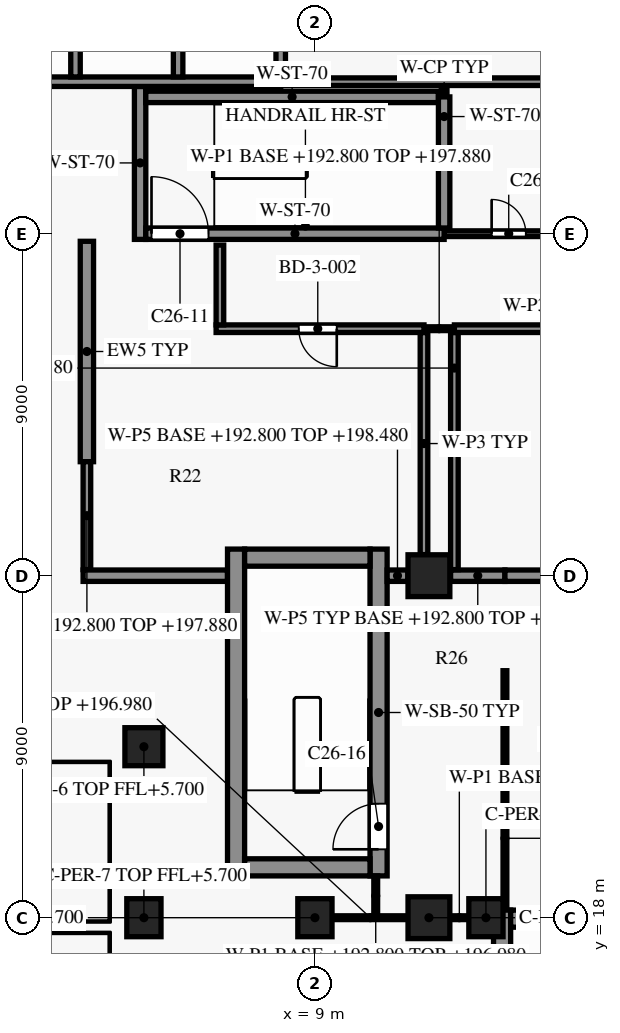
"""IFC4 building model, lengths in metres.
Left out: names, types, materials, properties, quantities, classifications, styles, units other than length and angle.
Written with IfcOpenShell. Run it as: python <this file> out.ifc"""

import sys

from ifc_helpers import new_model, si_unit, direction, frame, frame_2d, origin, origin_2d, place, context, subcontext, project, spatial, rectangle, extrude, element, fill, save


model = new_model("IFC4")
c1 = context("Model", 3, precision=1e-05, world=origin(), true_north=direction((0.0, 1.0)))
c2 = subcontext(c1, "Body", "Model", "MODEL_VIEW")
j1 = project(units=[si_unit("LENGTHUNIT", "METRE"), si_unit("PLANEANGLEUNIT", "RADIAN")], contexts=[c1])
p1 = place(None, origin())
s1 = spatial("IfcSite", under=j1, at=p1, CompositionType="ELEMENT")
p2 = place(p1, origin())
s2 = spatial("IfcBuilding", under=s1, at=p2, CompositionType="ELEMENT")
p3 = place(p2, frame((0.0, 0.0, 192.8)))
s3 = spatial("IfcBuildingStorey", under=s2, at=p3, CompositionType="ELEMENT", Elevation=192.8)
for number, where, z_axis, x_axis in (
    (1, (12.0, 18.0, 0.0), (0.0, 0.0, 1.0), (1.0, 0.0, 0.0)),
    (2, (12.0, 27.0, 0.0), (0.0, 0.0, 1.0), (1.0, 0.0, 0.0)),
):
    element("IfcColumn", number, at=place(p3, frame(where, z_axis=z_axis, x_axis=x_axis)), inside=s3, PredefinedType="COLUMN", context=c2, shape_type="SweptSolid", body=[
        extrude(rectangle(XDim=1.1, YDim=1.1, at=origin_2d()), origin(), (0.0, 0.0, 1.0), 6.0),
    ])
p4 = place(p3, frame((3.0, 30.0, 0.0), z_axis=(0.0, 0.0, 1.0), x_axis=(0.0, 1.0, 0.0)))
e3 = element("IfcWall", 3, at=p4, inside=s3, PredefinedType="SOLIDWALL", context=c2, shape_type="SweptSolid", body=[
    extrude(rectangle(XDim=5.8, YDim=0.35, at=frame_2d((2.9, 0.0))), origin(), (0.0, 0.0, 1.0), 5.5),
])
for number, where, z_axis, x_axis in (
    (4, (14.15, 17.975, 0.0), (0.0, 0.0, 1.0), (1.0, 0.0, 0.0)),
    (5, (7.15, 19.325, 0.0), (0.0, 0.0, 1.0), (1.0, 0.0, 0.0)),
    (6, (7.15, 27.475, 0.0), (0.0, 0.0, 1.0), (1.0, 0.0, 0.0)),
):
    element("IfcWall", number, at=place(p3, frame(where, z_axis=z_axis, x_axis=x_axis)), inside=s3, PredefinedType="SHEAR", context=c2, shape_type="SweptSolid", body=[
        extrude(rectangle(XDim=3.3, YDim=0.45, at=frame_2d((1.65, 0.0))), origin(), (0.0, 0.0, 1.0), 5.7),
    ])
p5 = place(p3, frame((12.4, 36.0, 0.0), z_axis=(0.0, 0.0, 1.0), x_axis=(1.0, 0.0, 0.0)))
e7 = element("IfcWall", 7, at=p5, inside=s3, PredefinedType="SHEAR", context=c2, shape_type="SweptSolid", body=[
    extrude(rectangle(XDim=11.825, YDim=0.15, at=frame_2d((5.913, 0.0))), origin(), (0.0, 0.0, 1.0), 5.7),
])
p6 = place(p5, frame((1.25, 0.0, 0.0)))
e8 = element("IfcOpeningElement", 8, at=p6, cuts=e7, PredefinedType="OPENING", context=c2, shape_type="SweptSolid", body=[
    extrude(rectangle(XDim=0.9, YDim=2.1, at=frame_2d((0.45, 1.05))), frame((0.0, 0.085, 0.0), z_axis=(0.0, -1.0, 0.0), x_axis=(1.0, 0.0, 0.0)), (0.0, 0.0, 1.0), 0.17),
])
p7 = place(p5, frame((5.2, 0.0, 0.0)))
e9 = element("IfcOpeningElement", 9, at=p7, cuts=e7, PredefinedType="OPENING", context=c2, shape_type="SweptSolid", body=[
    extrude(rectangle(XDim=0.9, YDim=2.1, at=frame_2d((0.45, 1.05))), frame((0.0, 0.085, 0.0), z_axis=(0.0, -1.0, 0.0), x_axis=(1.0, 0.0, 0.0)), (0.0, 0.0, 1.0), 0.17),
])
p8 = place(p5, frame((9.425, 0.0, 0.0)))
e10 = element("IfcOpeningElement", 10, at=p8, cuts=e7, PredefinedType="OPENING", context=c2, shape_type="SweptSolid", body=[
    extrude(rectangle(XDim=0.95, YDim=2.1, at=frame_2d((0.475, 1.05))), frame((0.0, 0.085, 0.0), z_axis=(0.0, -1.0, 0.0), x_axis=(1.0, 0.0, 0.0)), (0.0, 0.0, 1.0), 0.17),
])
p9 = place(p3, frame((4.55, 36.0, 0.0), z_axis=(0.0, 0.0, 1.0), x_axis=(1.0, 0.0, 0.0)))
e11 = element("IfcWall", 11, at=p9, inside=s3, PredefinedType="SHEAR", context=c2, shape_type="SweptSolid", body=[
    extrude(rectangle(XDim=7.85, YDim=0.3, at=frame_2d((3.925, 0.0))), origin(), (0.0, 0.0, 1.0), 5.7),
])
p10 = place(p9, frame((0.15, 0.0, 0.0)))
e12 = element("IfcOpeningElement", 12, at=p10, cuts=e11, PredefinedType="OPENING", context=c2, shape_type="SweptSolid", body=[
    extrude(rectangle(XDim=1.5, YDim=2.2, at=frame_2d((0.75, 1.1))), frame((0.0, 0.16, 0.0), z_axis=(0.0, -1.0, 0.0), x_axis=(1.0, 0.0, 0.0)), (0.0, 0.0, 1.0), 0.32),
])
p11 = place(p3, frame((4.55, 39.6, 0.0), z_axis=(0.0, 0.0, 1.0), x_axis=(1.0, 0.0, 0.0)))
e13 = element("IfcWall", 13, at=p11, inside=s3, PredefinedType="SHEAR", context=c2, shape_type="SweptSolid", body=[
    extrude(rectangle(XDim=7.7, YDim=0.3, at=frame_2d((3.85, 0.0))), origin(), (0.0, 0.0, 1.0), 5.7),
])
p12 = place(p3, frame((8.1, 40.0, 0.0), z_axis=(0.0, 0.0, 1.0), x_axis=(1.0, 0.0, 0.0)))
e14 = element("IfcWall", 14, at=p12, inside=s3, PredefinedType="PARTITIONING", context=c2, shape_type="SweptSolid", body=[
    extrude(rectangle(XDim=16.1, YDim=0.2, at=frame_2d((8.05, 0.0))), origin(), (0.0, 0.0, 1.0), 5.7),
])
p13 = place(p3, frame((0.125, 40.0, 0.0), z_axis=(0.0, 0.0, 1.0), x_axis=(1.0, 0.0, 0.0)))
e15 = element("IfcWall", 15, at=p13, inside=s3, PredefinedType="SHEAR", context=c2, shape_type="SweptSolid", body=[
    extrude(rectangle(XDim=7.975, YDim=0.25, at=frame_2d((3.988, 0.0))), origin(), (0.0, 0.0, 1.0), 5.7),
])
p14 = place(p3, frame((2.7, 40.125, 0.0), z_axis=(0.0, 0.0, 1.0), x_axis=(0.0, 1.0, 0.0)))
e16 = element("IfcWall", 16, at=p14, inside=s3, PredefinedType="SHEAR", context=c2, shape_type="SweptSolid", body=[
    extrude(rectangle(XDim=2.95, YDim=0.25, at=frame_2d((1.475, 0.0))), origin(), (0.0, 0.0, 1.0), 5.7),
])
p15 = place(p3, frame((4.4, 35.85, 0.0), z_axis=(0.0, 0.0, 1.0), x_axis=(0.0, 1.0, 0.0)))
e17 = element("IfcWall", 17, at=p15, inside=s3, PredefinedType="SHEAR", context=c2, shape_type="SweptSolid", body=[
    extrude(rectangle(XDim=4.025, YDim=0.3, at=frame_2d((2.012, 0.0))), origin(), (0.0, 0.0, 1.0), 5.7),
])
p16 = place(p3, frame((5.4, 40.125, 0.0), z_axis=(0.0, 0.0, 1.0), x_axis=(0.0, 1.0, 0.0)))
e18 = element("IfcWall", 18, at=p16, inside=s3, PredefinedType="SHEAR", context=c2, shape_type="SweptSolid", body=[
    extrude(rectangle(XDim=2.95, YDim=0.25, at=frame_2d((1.475, 0.0))), origin(), (0.0, 0.0, 1.0), 5.7),
])
p17 = place(p3, frame((6.925, 19.1, 0.0), z_axis=(0.0, 0.0, 1.0), x_axis=(0.0, 1.0, 0.0)))
e19 = element("IfcWall", 19, at=p17, inside=s3, PredefinedType="SHEAR", context=c2, shape_type="SweptSolid", body=[
    extrude(rectangle(XDim=8.6, YDim=0.45, at=frame_2d((4.3, 0.0))), origin(), (0.0, 0.0, 1.0), 5.7),
])
p18 = place(p3, frame((8.1, 40.125, 0.0), z_axis=(0.0, 0.0, 1.0), x_axis=(0.0, 1.0, 0.0)))
e20 = element("IfcWall", 20, at=p18, inside=s3, PredefinedType="SHEAR", context=c2, shape_type="SweptSolid", body=[
    extrude(rectangle(XDim=2.95, YDim=0.25, at=frame_2d((1.475, 0.0))), origin(), (0.0, 0.0, 1.0), 5.7),
])
p19 = place(p3, frame((10.675, 19.1, 0.0), z_axis=(0.0, 0.0, 1.0), x_axis=(0.0, 1.0, 0.0)))
e21 = element("IfcWall", 21, at=p19, inside=s3, PredefinedType="SHEAR", context=c2, shape_type="SweptSolid", body=[
    extrude(rectangle(XDim=8.6, YDim=0.45, at=frame_2d((4.3, 0.0))), origin(), (0.0, 0.0, 1.0), 5.7),
])
p20 = place(p19, frame((0.7, 0.0, 0.0)))
e22 = element("IfcOpeningElement", 22, at=p20, cuts=e21, PredefinedType="OPENING", context=c2, shape_type="SweptSolid", body=[
    extrude(rectangle(XDim=1.2, YDim=2.2, at=frame_2d((0.6, 1.1))), frame((0.0, 0.235, 0.0), z_axis=(0.0, -1.0, 0.0), x_axis=(1.0, 0.0, 0.0)), (0.0, 0.0, 1.0), 0.47),
])
p21 = place(p3, frame((12.4, 39.6, 0.0), z_axis=(0.0, 0.0, 1.0), x_axis=(0.0, 1.0, 0.0)))
e23 = element("IfcWall", 23, at=p21, inside=s3, PredefinedType="PARTITIONING", context=c2, shape_type="SweptSolid", body=[
    extrude(rectangle(XDim=0.3, YDim=0.15, at=frame_2d((0.15, 0.0))), origin(), (0.0, 0.0, 1.0), 5.7),
])
p22 = place(p3, frame((12.4, 36.15, 0.0), z_axis=(0.0, 0.0, 1.0), x_axis=(0.0, 1.0, 0.0)))
e24 = element("IfcWall", 24, at=p22, inside=s3, PredefinedType="SHEAR", context=c2, shape_type="SweptSolid", body=[
    extrude(rectangle(XDim=3.45, YDim=0.3, at=frame_2d((1.725, 0.0))), origin(), (0.0, 0.0, 1.0), 5.7),
])
p23 = place(p3, frame((13.925, 9.55, 0.0), z_axis=(0.0, 0.0, 1.0), x_axis=(0.0, 1.0, 0.0)))
e25 = element("IfcWall", 25, at=p23, inside=s3, PredefinedType="SHEAR", context=c2, shape_type="SweptSolid", body=[
    extrude(rectangle(XDim=8.65, YDim=0.45, at=frame_2d((4.325, 0.0))), origin(), (0.0, 0.0, 1.0), 5.7),
])
p24 = place(p3, frame((11.445, 18.0, 0.0), z_axis=(0.0, 0.0, 1.0), x_axis=(-1.0, 0.0, 0.0)))
e26 = element("IfcWall", 26, at=p24, inside=s3, PredefinedType="PARTITIONING", context=c2, shape_type="SweptSolid", body=[
    extrude(rectangle(XDim=1.975, YDim=0.1, at=frame_2d((0.988, 0.0))), origin(), (0.0, 0.0, 1.0), 4.18),
])
p25 = place(p3, frame((13.045, 18.0, 0.0), z_axis=(0.0, 0.0, 1.0), x_axis=(-1.0, 0.0, 0.0)))
e27 = element("IfcWall", 27, at=p25, inside=s3, PredefinedType="PARTITIONING", context=c2, shape_type="SweptSolid", body=[
    extrude(rectangle(XDim=0.49, YDim=0.1, at=frame_2d((0.245, 0.0))), origin(), (0.0, 0.0, 1.0), 4.18),
])
p26 = place(p3, frame((10.6, 18.05, 0.0), z_axis=(0.0, 0.0, 1.0), x_axis=(0.0, 1.0, 0.0)))
e28 = element("IfcWall", 28, at=p26, inside=s3, PredefinedType="PARTITIONING", context=c2, shape_type="SweptSolid", body=[
    extrude(rectangle(XDim=1.05, YDim=0.1, at=frame_2d((0.525, 0.0))), origin(), (0.0, 0.0, 1.0), 4.18),
])
p27 = place(p3, frame((14.0, 24.5, 0.0), z_axis=(0.0, 0.0, 1.0), x_axis=(0.0, -1.0, 0.0)))
e29 = element("IfcWall", 29, at=p27, inside=s3, PredefinedType="PARTITIONING", context=c2, shape_type="SweptSolid", body=[
    extrude(rectangle(XDim=6.3, YDim=0.1, at=frame_2d((3.15, 0.0))), origin(), (0.0, 0.0, 1.0), 5.68),
])
p28 = place(p3, frame((6.7, 27.0, 0.0), z_axis=(0.0, 0.0, 1.0), x_axis=(-1.0, 0.0, 0.0)))
e30 = element("IfcWall", 30, at=p28, inside=s3, PredefinedType="PARTITIONING", context=c2, shape_type="SweptSolid", body=[
    extrude(rectangle(XDim=3.8, YDim=0.3, at=frame_2d((1.9, 0.0))), origin(), (0.0, 0.0, 1.0), 5.08),
])
p29 = place(p3, frame((10.9, 27.0, 0.0), z_axis=(0.0, 0.0, 1.0), x_axis=(1.0, 0.0, 0.0)))
e31 = element("IfcWall", 31, at=p29, inside=s3, PredefinedType="PARTITIONING", context=c2, shape_type="SweptSolid", body=[
    extrude(rectangle(XDim=0.545, YDim=0.3, at=frame_2d((0.272, 0.0))), origin(), (0.0, 0.0, 1.0), 5.68),
])
p30 = place(p3, frame((12.57, 27.0, 0.0), z_axis=(0.0, 0.0, 1.0), x_axis=(1.0, 0.0, 0.0)))
e32 = element("IfcWall", 32, at=p30, inside=s3, PredefinedType="PARTITIONING", context=c2, shape_type="SweptSolid", body=[
    extrude(rectangle(XDim=1.43, YDim=0.3, at=frame_2d((0.715, 0.0))), origin(), (0.0, 0.0, 1.0), 5.08),
])
p31 = place(p3, frame((17.9, 27.0, 0.0), z_axis=(0.0, 0.0, 1.0), x_axis=(-1.0, 0.0, 0.0)))
e33 = element("IfcWall", 33, at=p31, inside=s3, PredefinedType="PARTITIONING", context=c2, shape_type="SweptSolid", body=[
    extrude(rectangle(XDim=3.9, YDim=0.3, at=frame_2d((1.95, 0.0))), origin(), (0.0, 0.0, 1.0), 5.08),
])
p32 = place(p3, frame((3.0, 27.16, 0.0), z_axis=(0.0, 0.0, 1.0), x_axis=(0.0, 1.0, 0.0)))
e34 = element("IfcWall", 34, at=p32, inside=s3, PredefinedType="PARTITIONING", context=c2, shape_type="SweptSolid", body=[
    extrude(rectangle(XDim=2.84, YDim=0.2, at=frame_2d((1.42, 0.0))), origin(), (0.0, 0.0, 1.0), 5.08),
])
p33 = place(p3, frame((12.67, 27.16, 0.0), z_axis=(0.0, 0.0, 1.0), x_axis=(0.0, 1.0, 0.0)))
e35 = element("IfcWall", 35, at=p33, inside=s3, PredefinedType="PARTITIONING", context=c2, shape_type="SweptSolid", body=[
    extrude(rectangle(XDim=6.24, YDim=0.2, at=frame_2d((3.12, 0.0))), origin(), (0.0, 0.0, 1.0), 5.08),
])
p34 = place(p3, frame((11.87, 33.4, 0.0), z_axis=(0.0, 0.0, 1.0), x_axis=(0.0, -1.0, 0.0)))
e36 = element("IfcWall", 36, at=p34, inside=s3, PredefinedType="PARTITIONING", context=c2, shape_type="SweptSolid", body=[
    extrude(rectangle(XDim=5.845, YDim=0.2, at=frame_2d((2.922, 0.0))), origin(), (0.0, 0.0, 1.0), 5.68),
])
p35 = place(p3, frame((11.87, 33.5, 0.0), z_axis=(0.0, 0.0, 1.0), x_axis=(-1.0, 0.0, 0.0)))
e37 = element("IfcWall", 37, at=p35, inside=s3, PredefinedType="PARTITIONING", context=c2, shape_type="SweptSolid", body=[
    extrude(rectangle(XDim=5.47, YDim=0.2, at=frame_2d((2.735, 0.0))), origin(), (0.0, 0.0, 1.0), 5.68),
])
p36 = place(p35, frame((2.295, 0.0, 0.0)))
e38 = element("IfcOpeningElement", 38, at=p36, cuts=e37, PredefinedType="OPENING", context=c2, shape_type="SweptSolid", body=[
    extrude(rectangle(XDim=1.0, YDim=2.1, at=frame_2d((0.5, 1.05))), frame((0.0, 0.11, 0.0), z_axis=(0.0, -1.0, 0.0), x_axis=(1.0, 0.0, 0.0)), (0.0, 0.0, 1.0), 0.22),
])
p37 = place(p3, frame((12.67, 33.5, 0.0), z_axis=(0.0, 0.0, 1.0), x_axis=(-1.0, 0.0, 0.0)))
e39 = element("IfcWall", 39, at=p37, inside=s3, PredefinedType="PARTITIONING", context=c2, shape_type="SweptSolid", body=[
    extrude(rectangle(XDim=0.8, YDim=0.1, at=frame_2d((0.4, 0.0))), origin(), (0.0, 0.0, 1.0), 5.08),
])
p38 = place(p3, frame((18.0, 33.5, 0.0), z_axis=(0.0, 0.0, 1.0), x_axis=(-1.0, 0.0, 0.0)))
e40 = element("IfcWall", 40, at=p38, inside=s3, PredefinedType="PARTITIONING", context=c2, shape_type="SweptSolid", body=[
    extrude(rectangle(XDim=5.33, YDim=0.2, at=frame_2d((2.665, 0.0))), origin(), (0.0, 0.0, 1.0), 5.68),
])
p39 = place(p3, frame((6.5, 33.6, 0.0), z_axis=(0.0, 0.0, 1.0), x_axis=(0.0, 1.0, 0.0)))
e41 = element("IfcWall", 41, at=p39, inside=s3, PredefinedType="PARTITIONING", context=c2, shape_type="SweptSolid", body=[
    extrude(rectangle(XDim=2.1, YDim=0.2, at=frame_2d((1.05, 0.0))), origin(), (0.0, 0.0, 1.0), 5.68),
])
p40 = place(p3, frame((4.5, 18.0, 0.0), z_axis=(0.0, 0.0, 1.0), x_axis=(1.0, 0.0, 0.0)))
e42 = element("IfcColumn", 42, at=p40, inside=s3, PredefinedType="COLUMN", context=c2, shape_type="SweptSolid", body=[
    extrude(rectangle(XDim=0.9, YDim=1.0, at=origin_2d()), origin(), (0.0, 0.0, 1.0), 5.7),
])
p41 = place(p3, frame((4.5, 22.5, 0.0), z_axis=(0.0, 0.0, 1.0), x_axis=(1.0, 0.0, 0.0)))
e43 = element("IfcColumn", 43, at=p41, inside=s3, PredefinedType="COLUMN", context=c2, shape_type="SweptSolid", body=[
    extrude(rectangle(XDim=1.0, YDim=1.0, at=origin_2d()), origin(), (0.0, 0.0, 1.0), 5.7),
])
for number, where, z_axis, x_axis in (
    (44, (9.0, 18.0, 0.0), (0.0, 0.0, 1.0), (1.0, 0.0, 0.0)),
    (45, (13.5, 18.0, 0.0), (0.0, 0.0, 1.0), (1.0, 0.0, 0.0)),
):
    element("IfcColumn", number, at=place(p3, frame(where, z_axis=z_axis, x_axis=x_axis)), inside=s3, PredefinedType="COLUMN", context=c2, shape_type="SweptSolid", body=[
        extrude(rectangle(XDim=0.9, YDim=1.0, at=origin_2d()), origin(), (0.0, 0.0, 1.0), 5.7),
    ])
p42 = place(p6, origin())
e46 = element("IfcDoor", 46, at=p42, inside=s3, OperationType="SINGLE_SWING_RIGHT", PredefinedType="DOOR", context=c2, shape_type="SweptSolid", body=[
    extrude(rectangle(XDim=0.9, YDim=2.1, at=frame_2d((0.45, 1.05))), frame((0.0, 0.025, 0.0), z_axis=(0.0, -1.0, 0.0), x_axis=(1.0, 0.0, 0.0)), (0.0, 0.0, 1.0), 0.05),
])
fill(e8, e46)
p43 = place(p10, origin())
e47 = element("IfcDoor", 47, at=p43, inside=s3, OperationType="SINGLE_SWING_RIGHT", PredefinedType="DOOR", context=c2, shape_type="SweptSolid", body=[
    extrude(rectangle(XDim=1.5, YDim=2.2, at=frame_2d((0.75, 1.1))), frame((0.0, 0.025, 0.0), z_axis=(0.0, -1.0, 0.0), x_axis=(1.0, 0.0, 0.0)), (0.0, 0.0, 1.0), 0.05),
])
fill(e12, e47)
p44 = place(p20, origin())
e48 = element("IfcDoor", 48, at=p44, inside=s3, OperationType="SINGLE_SWING_RIGHT", PredefinedType="DOOR", context=c2, shape_type="SweptSolid", body=[
    extrude(rectangle(XDim=1.2, YDim=2.2, at=frame_2d((0.6, 1.1))), frame((0.0, 0.025, 0.0), z_axis=(0.0, -1.0, 0.0), x_axis=(1.0, 0.0, 0.0)), (0.0, 0.0, 1.0), 0.05),
])
fill(e22, e48)
p45 = place(p36, origin())
e49 = element("IfcDoor", 49, at=p45, inside=s3, OperationType="SINGLE_SWING_LEFT", PredefinedType="DOOR", context=c2, shape_type="SweptSolid", body=[
    extrude(rectangle(XDim=1.0, YDim=2.1, at=frame_2d((0.5, 1.05))), frame((0.0, 0.025, 0.0), z_axis=(0.0, -1.0, 0.0), x_axis=(1.0, 0.0, 0.0)), (0.0, 0.0, 1.0), 0.05),
])
fill(e38, e49)
save(model, sys.argv[1])
